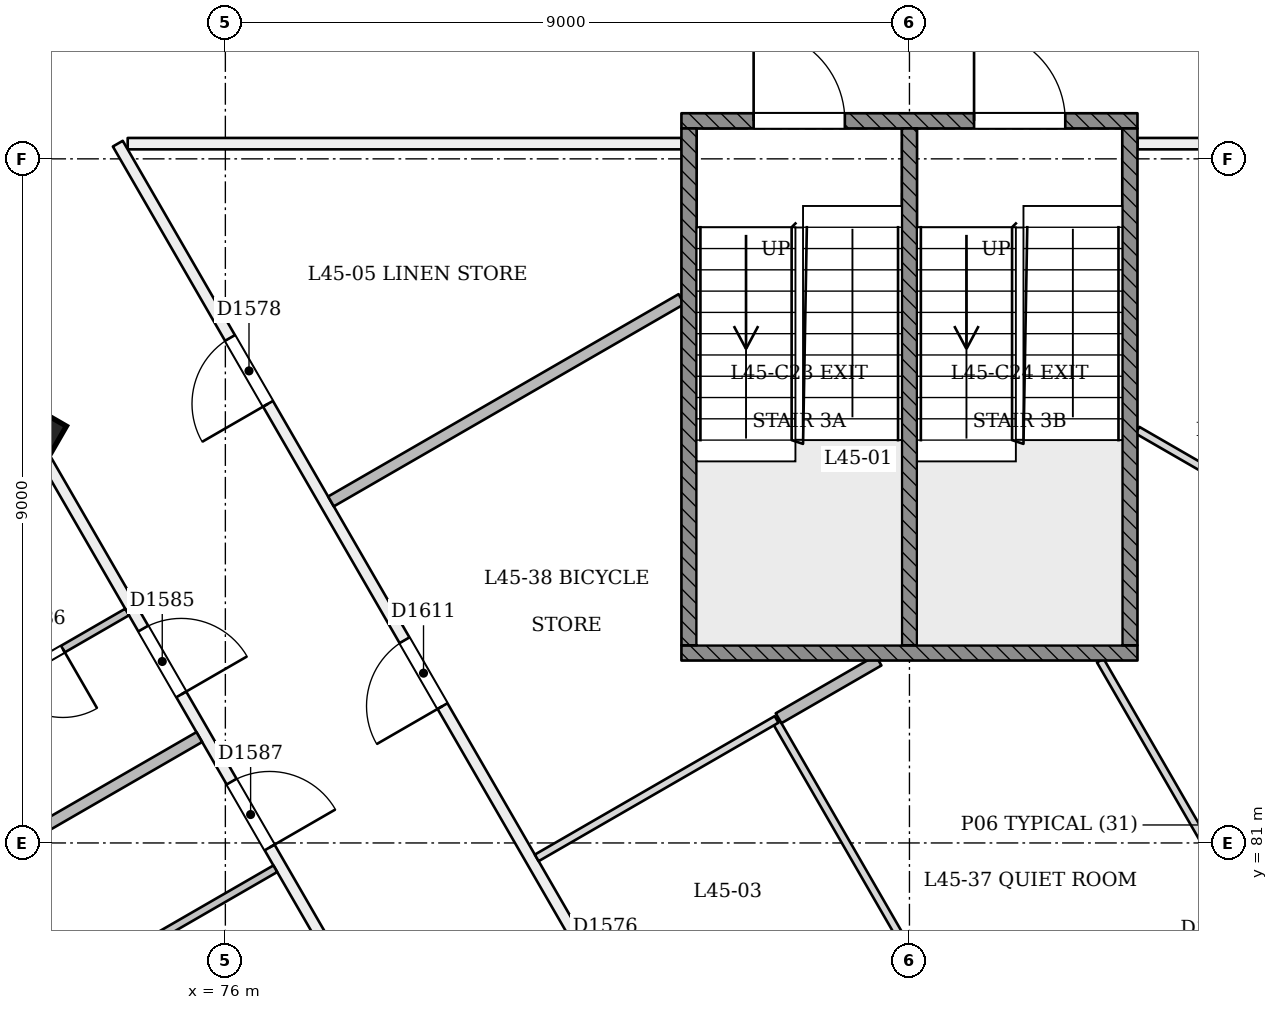
"""IFC4 building model, lengths in metres.
Left out: names, types, materials, properties, quantities, classifications, styles, units other than length and angle.
Written with IfcOpenShell. Run it as: python <this file> out.ifc"""

import sys

from ifc_helpers import new_model, si_unit, direction, frame, frame_2d, origin, origin_2d, place, context, subcontext, project, spatial, rectangle, extrude, element, fill, save


model = new_model("IFC4")
c1 = context("Model", 3, precision=1e-05, world=origin(), true_north=direction((0.0, 1.0)))
c2 = subcontext(c1, "Body", "Model", "MODEL_VIEW")
j1 = project(units=[si_unit("LENGTHUNIT", "METRE"), si_unit("PLANEANGLEUNIT", "RADIAN")], contexts=[c1])
p1 = place(None, origin())
s1 = spatial("IfcSite", under=j1, at=p1, CompositionType="ELEMENT")
p2 = place(p1, origin())
s2 = spatial("IfcBuilding", under=s1, at=p2, CompositionType="ELEMENT")
p3 = place(p2, frame((0.0, 0.0, 174.6)))
s3 = spatial("IfcBuildingStorey", under=s2, at=p3, CompositionType="ELEMENT", Elevation=174.6)
p4 = place(p3, frame((73.472, 86.327, -0.018), z_axis=(0.022221406801, 0.038413224561, 0.999014831351), x_axis=(-0.866024056676, -0.498523132273, 0.038432015909)))
e1 = element("IfcColumn", 1, at=p4, inside=s3, PredefinedType="COLUMN", context=c2, shape_type="SweptSolid", body=[
    extrude(rectangle(XDim=0.6, YDim=0.6, at=origin_2d()), origin(), (0.0, 0.0, 1.0), 3.604),
])
p5 = place(p3, frame((95.415, 90.2, 0.0), z_axis=(0.0, 0.0, 1.0), x_axis=(-0.500002869824, -0.866023746885, 0.0)))
e2 = element("IfcWall", 2, at=p5, inside=s3, PredefinedType="PARTITIONING", context=c2, shape_type="SweptSolid", body=[
    extrude(rectangle(XDim=20.7, YDim=0.15, at=frame_2d((10.35, 0.0))), origin(), (0.0, 0.0, 1.0), 3.15),
])
p6 = place(p5, frame((8.391, 0.0, 0.0)))
e3 = element("IfcOpeningElement", 3, at=p6, cuts=e2, PredefinedType="OPENING", context=c2, shape_type="SweptSolid", body=[
    extrude(rectangle(XDim=0.9, YDim=2.1, at=frame_2d((0.45, 1.05))), frame((0.0, 0.085, 0.0), z_axis=(0.0, -1.0, 0.0), x_axis=(1.0, 0.0, 0.0)), (0.0, 0.0, 1.0), 0.171),
])
p7 = place(p5, frame((3.637, 0.0, 0.0)))
e4 = element("IfcOpeningElement", 4, at=p7, cuts=e2, PredefinedType="OPENING", context=c2, shape_type="SweptSolid", body=[
    extrude(rectangle(XDim=1.0, YDim=2.1, at=frame_2d((0.5, 1.05))), frame((0.0, 0.085, 0.0), z_axis=(0.0, -1.0, 0.0), x_axis=(1.0, 0.0, 0.0)), (0.0, 0.0, 1.0), 0.171),
])
p8 = place(p5, frame((12.351, 0.0, 0.0)))
e5 = element("IfcOpeningElement", 5, at=p8, cuts=e2, PredefinedType="OPENING", context=c2, shape_type="SweptSolid", body=[
    extrude(rectangle(XDim=1.0, YDim=2.1, at=frame_2d((0.5, 1.05))), frame((0.0, 0.085, 0.0), z_axis=(0.0, -1.0, 0.0), x_axis=(1.0, 0.0, 0.0)), (0.0, 0.0, 1.0), 0.171),
])
p9 = place(p3, frame((74.715, 90.2, 0.0), z_axis=(0.0, 0.0, 1.0), x_axis=(1.0, 0.0, 0.0)))
e6 = element("IfcWall", 6, at=p9, inside=s3, PredefinedType="PARTITIONING", context=c2, shape_type="SweptSolid", body=[
    extrude(rectangle(XDim=7.285, YDim=0.15, at=frame_2d((3.643, 0.0))), origin(), (0.0, 0.0, 1.0), 3.15),
])
p10 = place(p3, frame((71.222, 90.225, 0.0), z_axis=(0.0, 0.0, 1.0), x_axis=(0.500002130291, -0.866024173857, 0.0)))
e7 = element("IfcWall", 7, at=p10, inside=s3, PredefinedType="PARTITIONING", context=c2, shape_type="SweptSolid", body=[
    extrude(rectangle(XDim=27.556, YDim=0.15, at=frame_2d((13.778, 0.0))), origin(), (0.0, 0.0, 1.0), 2.75),
])
p11 = place(p10, frame((0.72, 0.0, 0.0)))
e8 = element("IfcOpeningElement", 8, at=p11, cuts=e7, PredefinedType="OPENING", context=c2, shape_type="SweptSolid", body=[
    extrude(rectangle(XDim=1.0, YDim=2.1, at=frame_2d((0.5, 1.05))), frame((0.0, 0.085, 0.0), z_axis=(0.0, -1.0, 0.0), x_axis=(1.0, 0.0, 0.0)), (0.0, 0.0, 1.0), 0.171),
])
p12 = place(p10, frame((7.395, 0.0, 0.0)))
e9 = element("IfcOpeningElement", 9, at=p12, cuts=e7, PredefinedType="OPENING", context=c2, shape_type="SweptSolid", body=[
    extrude(rectangle(XDim=1.0, YDim=2.1, at=frame_2d((0.5, 1.05))), frame((0.0, 0.085, 0.0), z_axis=(0.0, -1.0, 0.0), x_axis=(1.0, 0.0, 0.0)), (0.0, 0.0, 1.0), 0.171),
])
p13 = place(p10, frame((9.72, 0.0, 0.0)))
e10 = element("IfcOpeningElement", 10, at=p13, cuts=e7, PredefinedType="OPENING", context=c2, shape_type="SweptSolid", body=[
    extrude(rectangle(XDim=1.0, YDim=2.1, at=frame_2d((0.5, 1.05))), frame((0.0, 0.085, 0.0), z_axis=(0.0, -1.0, 0.0), x_axis=(1.0, 0.0, 0.0)), (0.0, 0.0, 1.0), 0.171),
])
p14 = place(p10, frame((16.28, 0.0, 0.0)))
e11 = element("IfcOpeningElement", 11, at=p14, cuts=e7, PredefinedType="OPENING", context=c2, shape_type="SweptSolid", body=[
    extrude(rectangle(XDim=1.0, YDim=2.1, at=frame_2d((0.5, 1.05))), frame((0.0, 0.085, 0.0), z_axis=(0.0, -1.0, 0.0), x_axis=(1.0, 0.0, 0.0)), (0.0, 0.0, 1.0), 0.171),
])
p15 = place(p10, frame((18.72, 0.0, 0.0)))
e12 = element("IfcOpeningElement", 12, at=p15, cuts=e7, PredefinedType="OPENING", context=c2, shape_type="SweptSolid", body=[
    extrude(rectangle(XDim=1.0, YDim=2.1, at=frame_2d((0.5, 1.05))), frame((0.0, 0.085, 0.0), z_axis=(0.0, -1.0, 0.0), x_axis=(1.0, 0.0, 0.0)), (0.0, 0.0, 1.0), 0.171),
])
p16 = place(p10, frame((25.697, 0.0, 0.0)))
e13 = element("IfcOpeningElement", 13, at=p16, cuts=e7, PredefinedType="OPENING", context=c2, shape_type="SweptSolid", body=[
    extrude(rectangle(XDim=1.2, YDim=2.1, at=frame_2d((0.6, 1.05))), frame((0.0, 0.085, 0.0), z_axis=(0.0, -1.0, 0.0), x_axis=(1.0, 0.0, 0.0)), (0.0, 0.0, 1.0), 0.171),
])
p17 = place(p3, frame((85.065, 66.473, 0.0), z_axis=(0.0, 0.0, 1.0), x_axis=(0.500005289472, 0.866022349885, 0.0)))
e14 = element("IfcWall", 14, at=p17, inside=s3, PredefinedType="PARTITIONING", context=c2, shape_type="SweptSolid", body=[
    extrude(rectangle(XDim=27.397, YDim=0.15, at=frame_2d((13.699, 0.0))), origin(), (0.0, 0.0, 1.0), 2.75),
])
p18 = place(p17, frame((1.03, 0.0, 0.0)))
e15 = element("IfcOpeningElement", 15, at=p18, cuts=e14, PredefinedType="OPENING", context=c2, shape_type="SweptSolid", body=[
    extrude(rectangle(XDim=1.0, YDim=2.1, at=frame_2d((0.5, 1.05))), frame((0.0, 0.085, 0.0), z_axis=(0.0, -1.0, 0.0), x_axis=(1.0, 0.0, 0.0)), (0.0, 0.0, 1.0), 0.171),
])
p19 = place(p17, frame((7.821, 0.0, 0.0)))
e16 = element("IfcOpeningElement", 16, at=p19, cuts=e14, PredefinedType="OPENING", context=c2, shape_type="SweptSolid", body=[
    extrude(rectangle(XDim=1.0, YDim=2.1, at=frame_2d((0.5, 1.05))), frame((0.0, 0.085, 0.0), z_axis=(0.0, -1.0, 0.0), x_axis=(1.0, 0.0, 0.0)), (0.0, 0.0, 1.0), 0.171),
])
p20 = place(p17, frame((10.03, 0.0, 0.0)))
e17 = element("IfcOpeningElement", 17, at=p20, cuts=e14, PredefinedType="OPENING", context=c2, shape_type="SweptSolid", body=[
    extrude(rectangle(XDim=1.0, YDim=2.1, at=frame_2d((0.5, 1.05))), frame((0.0, 0.085, 0.0), z_axis=(0.0, -1.0, 0.0), x_axis=(1.0, 0.0, 0.0)), (0.0, 0.0, 1.0), 0.171),
])
p21 = place(p17, frame((16.821, 0.0, 0.0)))
e18 = element("IfcOpeningElement", 18, at=p21, cuts=e14, PredefinedType="OPENING", context=c2, shape_type="SweptSolid", body=[
    extrude(rectangle(XDim=1.0, YDim=2.1, at=frame_2d((0.5, 1.05))), frame((0.0, 0.085, 0.0), z_axis=(0.0, -1.0, 0.0), x_axis=(1.0, 0.0, 0.0)), (0.0, 0.0, 1.0), 0.171),
])
p22 = place(p17, frame((19.03, 0.0, 0.0)))
e19 = element("IfcOpeningElement", 19, at=p22, cuts=e14, PredefinedType="OPENING", context=c2, shape_type="SweptSolid", body=[
    extrude(rectangle(XDim=1.0, YDim=2.1, at=frame_2d((0.5, 1.05))), frame((0.0, 0.085, 0.0), z_axis=(0.0, -1.0, 0.0), x_axis=(1.0, 0.0, 0.0)), (0.0, 0.0, 1.0), 0.171),
])
p23 = place(p17, frame((25.912, 0.0, 0.0)))
e20 = element("IfcOpeningElement", 20, at=p23, cuts=e14, PredefinedType="OPENING", context=c2, shape_type="SweptSolid", body=[
    extrude(rectangle(XDim=1.2, YDim=2.1, at=frame_2d((0.6, 1.05))), frame((0.0, 0.085, 0.0), z_axis=(0.0, -1.0, 0.0), x_axis=(1.0, 0.0, 0.0)), (0.0, 0.0, 1.0), 0.171),
])
p24 = place(p3, frame((88.0, 90.2, 0.0), z_axis=(0.0, 0.0, 1.0), x_axis=(1.0, 0.0, 0.0)))
e21 = element("IfcWall", 21, at=p24, inside=s3, PredefinedType="PARTITIONING", context=c2, shape_type="SweptSolid", body=[
    extrude(rectangle(XDim=7.285, YDim=0.15, at=frame_2d((3.643, 0.0))), origin(), (0.0, 0.0, 1.0), 3.15),
])
p25 = place(p3, frame((85.0, 72.161, 0.0), z_axis=(0.0, 0.0, 1.0), x_axis=(-0.500006534091, 0.866021631292, 0.0)))
e22 = element("IfcWall", 22, at=p25, inside=s3, PredefinedType="PARTITIONING", context=c2, shape_type="SweptSolid", body=[
    extrude(rectangle(XDim=20.83, YDim=0.15, at=frame_2d((10.415, 0.0))), origin(), (0.0, 0.0, 1.0), 3.15),
])
p26 = place(p25, frame((7.554, 0.0, 0.0)))
e23 = element("IfcOpeningElement", 23, at=p26, cuts=e22, PredefinedType="OPENING", context=c2, shape_type="SweptSolid", body=[
    extrude(rectangle(XDim=0.9, YDim=2.1, at=frame_2d((0.45, 1.05))), frame((0.0, 0.085, 0.0), z_axis=(0.0, -1.0, 0.0), x_axis=(1.0, 0.0, 0.0)), (0.0, 0.0, 1.0), 0.171),
])
p27 = place(p25, frame((3.032, 0.0, 0.0)))
e24 = element("IfcOpeningElement", 24, at=p27, cuts=e22, PredefinedType="OPENING", context=c2, shape_type="SweptSolid", body=[
    extrude(rectangle(XDim=1.0, YDim=2.1, at=frame_2d((0.5, 1.05))), frame((0.0, 0.085, 0.0), z_axis=(0.0, -1.0, 0.0), x_axis=(1.0, 0.0, 0.0)), (0.0, 0.0, 1.0), 0.171),
])
p28 = place(p25, frame((16.878, 0.0, 0.0)))
e25 = element("IfcOpeningElement", 25, at=p28, cuts=e22, PredefinedType="OPENING", context=c2, shape_type="SweptSolid", body=[
    extrude(rectangle(XDim=1.0, YDim=2.1, at=frame_2d((0.5, 1.05))), frame((0.0, 0.085, 0.0), z_axis=(0.0, -1.0, 0.0), x_axis=(1.0, 0.0, 0.0)), (0.0, 0.0, 1.0), 0.171),
])
p29 = place(p25, frame((12.286, 0.0, 0.0)))
e26 = element("IfcOpeningElement", 26, at=p29, cuts=e22, PredefinedType="OPENING", context=c2, shape_type="SweptSolid", body=[
    extrude(rectangle(XDim=1.0, YDim=2.1, at=frame_2d((0.5, 1.05))), frame((0.0, 0.085, 0.0), z_axis=(0.0, -1.0, 0.0), x_axis=(1.0, 0.0, 0.0)), (0.0, 0.0, 1.0), 0.171),
])
p30 = place(p3, frame((91.864, 84.199, 0.0), z_axis=(0.0, 0.0, 1.0), x_axis=(-0.866018833748, 0.500011379465, 0.0)))
e27 = element("IfcWall", 27, at=p30, inside=s3, PredefinedType="PARTITIONING", context=c2, shape_type="SweptSolid", body=[
    extrude(rectangle(XDim=4.462, YDim=0.1, at=frame_2d((2.231, 0.0))), origin(), (0.0, 0.0, 1.0), 3.15),
])
p31 = place(p3, frame((87.51, 83.4, 0.0), z_axis=(0.0, 0.0, 1.0), x_axis=(0.499979582667, -0.866037191416, 0.0)))
e28 = element("IfcWall", 28, at=p31, inside=s3, PredefinedType="PARTITIONING", context=c2, shape_type="SweptSolid", body=[
    extrude(rectangle(XDim=3.863, YDim=0.1, at=frame_2d((1.932, 0.0))), origin(), (0.0, 0.0, 1.0), 3.15),
])
p32 = place(p3, frame((85.177, 79.251, 0.0), z_axis=(0.0, 0.0, 1.0), x_axis=(-0.500025259026, 0.866010819988, 0.0)))
e29 = element("IfcWall", 29, at=p32, inside=s3, PredefinedType="PARTITIONING", context=c2, shape_type="SweptSolid", body=[
    extrude(rectangle(XDim=3.885, YDim=0.1, at=frame_2d((1.942, 0.0))), origin(), (0.0, 0.0, 1.0), 3.15),
])
p33 = place(p3, frame((83.252, 82.625, 0.0), z_axis=(0.0, 0.0, 1.0), x_axis=(-0.866032721818, -0.499987324581, 0.0)))
e30 = element("IfcWall", 30, at=p33, inside=s3, PredefinedType="PARTITIONING", context=c2, shape_type="SweptSolid", body=[
    extrude(rectangle(XDim=3.644, YDim=0.1, at=frame_2d((1.822, 0.0))), origin(), (0.0, 0.0, 1.0), 3.15),
])
p34 = place(p3, frame((77.389, 85.493, 0.0), z_axis=(0.0, 0.0, 1.0), x_axis=(0.866022170906, 0.500005599468, 0.0)))
e31 = element("IfcWall", 31, at=p34, inside=s3, PredefinedType="PARTITIONING", context=c2, shape_type="SweptSolid", body=[
    extrude(rectangle(XDim=5.324, YDim=0.15, at=frame_2d((2.662, 0.0))), origin(), (0.0, 0.0, 1.0), 3.15),
])
p35 = place(p3, frame((74.707, 84.038, 0.0), z_axis=(0.0, 0.0, 1.0), x_axis=(-0.866046596414, -0.499963291492, 0.0)))
e32 = element("IfcWall", 32, at=p35, inside=s3, PredefinedType="PARTITIONING", context=c2, shape_type="SweptSolid", body=[
    extrude(rectangle(XDim=2.925, YDim=0.1, at=frame_2d((1.462, 0.0))), origin(), (0.0, 0.0, 1.0), 3.15),
])
p36 = place(p35, frame((0.975, 0.0, 0.0)))
e33 = element("IfcOpeningElement", 33, at=p36, cuts=e32, PredefinedType="OPENING", context=c2, shape_type="SweptSolid", body=[
    extrude(rectangle(XDim=0.9, YDim=2.1, at=frame_2d((0.45, 1.05))), frame((0.0, 0.061, 0.0), z_axis=(0.0, -1.0, 0.0), x_axis=(1.0, 0.0, 0.0)), (0.0, 0.0, 1.0), 0.121),
])
p37 = place(p3, frame((70.162, 79.22, 0.0), z_axis=(0.0, 0.0, 1.0), x_axis=(0.866025401434, 0.500000004071, 0.0)))
e34 = element("IfcWall", 34, at=p37, inside=s3, PredefinedType="PARTITIONING", context=c2, shape_type="SweptSolid", body=[
    extrude(rectangle(XDim=6.345, YDim=0.15, at=frame_2d((3.173, 0.0))), origin(), (0.0, 0.0, 1.0), 2.65),
])
p38 = place(p3, frame((74.211, 79.248, 0.0), z_axis=(0.0, 0.0, 1.0), x_axis=(0.866011447264, 0.500024172624, 0.0)))
e35 = element("IfcWall", 35, at=p38, inside=s3, PredefinedType="PARTITIONING", context=c2, shape_type="SweptSolid", body=[
    extrude(rectangle(XDim=2.825, YDim=0.1, at=frame_2d((1.413, 0.0))), origin(), (0.0, 0.0, 1.0), 3.15),
])
p39 = place(p3, frame((84.594, 83.4, 0.0), z_axis=(0.0, 0.0, 1.0), x_axis=(-0.866038344573, -0.499977585228, 0.0)))
e36 = element("IfcWall", 36, at=p39, inside=s3, PredefinedType="PARTITIONING", context=c2, shape_type="SweptSolid", body=[
    extrude(rectangle(XDim=1.519, YDim=0.15, at=frame_2d((0.759, 0.0))), origin(), (0.0, 0.0, 1.0), 3.15),
])
p40 = place(p3, frame((82.0, 90.5, 0.0), z_axis=(0.0, 0.0, 1.0), x_axis=(1.0, 0.0, 0.0)))
e37 = element("IfcWall", 37, at=p40, inside=s3, PredefinedType="SOLIDWALL", context=c2, shape_type="SweptSolid", body=[
    extrude(rectangle(XDim=6.0, YDim=0.2, at=frame_2d((3.0, 0.0))), origin(), (0.0, 0.0, 1.0), 3.15),
])
p41 = place(p40, frame((0.95, 0.0, 0.0)))
e38 = element("IfcOpeningElement", 38, at=p41, cuts=e37, PredefinedType="OPENING", context=c2, shape_type="SweptSolid", body=[
    extrude(rectangle(XDim=1.2, YDim=2.1, at=frame_2d((0.6, 1.05))), frame((0.0, 0.11, 0.0), z_axis=(0.0, -1.0, 0.0), x_axis=(1.0, 0.0, 0.0)), (0.0, 0.0, 1.0), 0.221),
])
p42 = place(p40, frame((3.85, 0.0, 0.0)))
e39 = element("IfcOpeningElement", 39, at=p42, cuts=e37, PredefinedType="OPENING", context=c2, shape_type="SweptSolid", body=[
    extrude(rectangle(XDim=1.2, YDim=2.1, at=frame_2d((0.6, 1.05))), frame((0.0, 0.11, 0.0), z_axis=(0.0, -1.0, 0.0), x_axis=(1.0, 0.0, 0.0)), (0.0, 0.0, 1.0), 0.221),
])
p43 = place(p3, frame((82.0, 83.5, 0.0), z_axis=(0.0, 0.0, 1.0), x_axis=(1.0, 0.0, 0.0)))
e40 = element("IfcWall", 40, at=p43, inside=s3, PredefinedType="SOLIDWALL", context=c2, shape_type="SweptSolid", body=[
    extrude(rectangle(XDim=6.0, YDim=0.2, at=frame_2d((3.0, 0.0))), origin(), (0.0, 0.0, 1.0), 3.15),
])
for number, where, z_axis, x_axis in (
    (41, (82.1, 83.6, 0.0), (0.0, 0.0, 1.0), (0.0, 1.0, 0.0)),
    (42, (87.9, 83.6, 0.0), (0.0, 0.0, 1.0), (0.0, 1.0, 0.0)),
    (43, (85.0, 83.6, 0.0), (0.0, 0.0, 1.0), (0.0, 1.0, 0.0)),
):
    element("IfcWall", number, at=place(p3, frame(where, z_axis=z_axis, x_axis=x_axis)), inside=s3, PredefinedType="SOLIDWALL", context=c2, shape_type="SweptSolid", body=[
        extrude(rectangle(XDim=6.8, YDim=0.2, at=frame_2d((3.4, 0.0))), origin(), (0.0, 0.0, 1.0), 3.15),
    ])
p44 = place(p28, origin())
e44 = element("IfcDoor", 44, at=p44, inside=s3, OperationType="SINGLE_SWING_LEFT", PredefinedType="NOTDEFINED", context=c2, shape_type="SweptSolid", body=[
    extrude(rectangle(XDim=1.0, YDim=2.1, at=frame_2d((0.5, 1.05))), frame((0.0, 0.025, 0.0), z_axis=(0.0, -1.0, 0.0), x_axis=(1.0, 0.0, 0.0)), (0.0, 0.0, 1.0), 0.05),
])
fill(e25, e44)
p45 = place(p12, origin())
e45 = element("IfcDoor", 45, at=p45, inside=s3, OperationType="SINGLE_SWING_RIGHT", PredefinedType="NOTDEFINED", context=c2, shape_type="SweptSolid", body=[
    extrude(rectangle(XDim=1.0, YDim=2.1, at=frame_2d((0.5, 1.05))), frame((0.0, 0.025, 0.0), z_axis=(0.0, -1.0, 0.0), x_axis=(1.0, 0.0, 0.0)), (0.0, 0.0, 1.0), 0.05),
])
fill(e9, e45)
p46 = place(p36, origin())
e46 = element("IfcDoor", 46, at=p46, inside=s3, OperationType="SINGLE_SWING_LEFT", PredefinedType="NOTDEFINED", context=c2, shape_type="SweptSolid", body=[
    extrude(rectangle(XDim=0.9, YDim=2.1, at=frame_2d((0.45, 1.05))), frame((0.0, 0.025, 0.0), z_axis=(0.0, -1.0, 0.0), x_axis=(1.0, 0.0, 0.0)), (0.0, 0.0, 1.0), 0.05),
])
fill(e33, e46)
p47 = place(p13, origin())
e47 = element("IfcDoor", 47, at=p47, inside=s3, OperationType="SINGLE_SWING_RIGHT", PredefinedType="NOTDEFINED", context=c2, shape_type="SweptSolid", body=[
    extrude(rectangle(XDim=1.0, YDim=2.1, at=frame_2d((0.5, 1.05))), frame((0.0, 0.025, 0.0), z_axis=(0.0, -1.0, 0.0), x_axis=(1.0, 0.0, 0.0)), (0.0, 0.0, 1.0), 0.05),
])
fill(e10, e47)
p48 = place(p29, origin())
e48 = element("IfcDoor", 48, at=p48, inside=s3, OperationType="SINGLE_SWING_LEFT", PredefinedType="NOTDEFINED", context=c2, shape_type="SweptSolid", body=[
    extrude(rectangle(XDim=1.0, YDim=2.1, at=frame_2d((0.5, 1.05))), frame((0.0, 0.025, 0.0), z_axis=(0.0, -1.0, 0.0), x_axis=(1.0, 0.0, 0.0)), (0.0, 0.0, 1.0), 0.05),
])
fill(e26, e48)
p49 = place(p41, origin())
e49 = element("IfcDoor", 49, at=p49, inside=s3, OperationType="SINGLE_SWING_LEFT", PredefinedType="NOTDEFINED", context=c2, shape_type="SweptSolid", body=[
    extrude(rectangle(XDim=1.2, YDim=2.1, at=frame_2d((0.6, 1.05))), frame((0.0, 0.025, 0.0), z_axis=(0.0, -1.0, 0.0), x_axis=(1.0, 0.0, 0.0)), (0.0, 0.0, 1.0), 0.05),
])
fill(e38, e49)
p50 = place(p42, origin())
e50 = element("IfcDoor", 50, at=p50, inside=s3, OperationType="SINGLE_SWING_LEFT", PredefinedType="NOTDEFINED", context=c2, shape_type="SweptSolid", body=[
    extrude(rectangle(XDim=1.2, YDim=2.1, at=frame_2d((0.6, 1.05))), frame((0.0, 0.025, 0.0), z_axis=(0.0, -1.0, 0.0), x_axis=(1.0, 0.0, 0.0)), (0.0, 0.0, 1.0), 0.05),
])
fill(e39, e50)
save(model, sys.argv[1])
